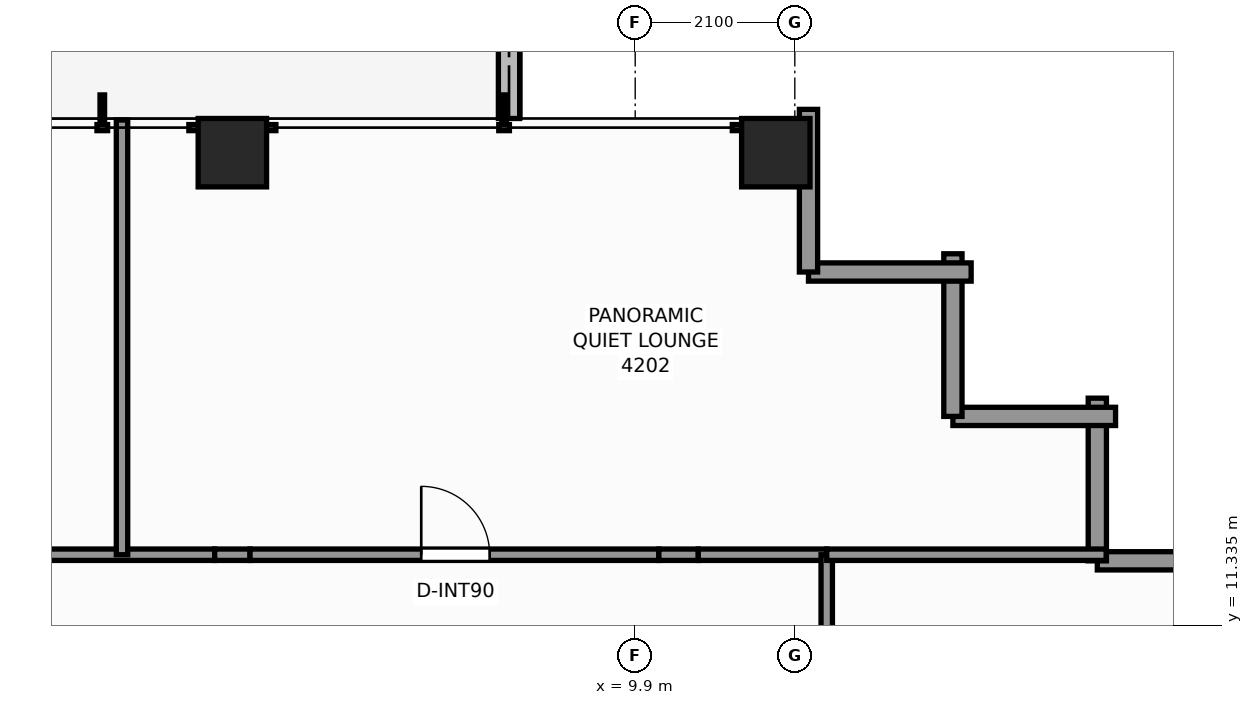
"""IFC4 building model, lengths in metres.
Left out: names, types, materials, properties, quantities, classifications, styles, units other than length and angle.
Written with IfcOpenShell. Run it as: python <this file> out.ifc"""

import sys

from ifc_helpers import new_model, si_unit, direction, frame, frame_2d, origin, origin_2d, place, context, subcontext, project, spatial, rectangle, extrude, element, fill, save


model = new_model("IFC4")
c1 = context("Model", 3, precision=1e-05, world=origin(), true_north=direction((0.0, 1.0)))
c2 = subcontext(c1, "Body", "Model", "MODEL_VIEW")
j1 = project(units=[si_unit("LENGTHUNIT", "METRE"), si_unit("PLANEANGLEUNIT", "RADIAN")], contexts=[c1])
p1 = place(None, origin())
s1 = spatial("IfcSite", under=j1, at=p1, CompositionType="ELEMENT")
p2 = place(p1, origin())
s2 = spatial("IfcBuilding", under=s1, at=p2, CompositionType="ELEMENT")
p3 = place(p2, frame((0.0, 0.0, 144.8)))
s3 = spatial("IfcBuildingStorey", under=s2, at=p3, CompositionType="ELEMENT", Elevation=144.8)
for number, where, z_axis, x_axis in (
    (1, (4.6, 17.55, 0.0), (0.0, 0.0, 1.0), (1.0, 0.0, 0.0)),
    (2, (11.75, 17.55, 0.0), (0.0, 0.0, 1.0), (1.0, 0.0, 0.0)),
):
    element("IfcColumn", number, at=place(p3, frame(where, z_axis=z_axis, x_axis=x_axis)), inside=s3, PredefinedType="COLUMN", context=c2, shape_type="SweptSolid", body=[
        extrude(rectangle(XDim=0.9, YDim=0.9, at=origin_2d()), origin(), (0.0, 0.0, 1.0), 3.3),
    ])
p4 = place(p3, frame((8.24, 18.0, -0.02), z_axis=(0.0, 0.0, 1.0), x_axis=(0.0, 1.0, 0.0)))
e3 = element("IfcWall", 3, at=p4, inside=s3, PredefinedType="PARAPET", context=c2, shape_type="SweptSolid", body=[
    extrude(rectangle(XDim=3.42, YDim=0.28, at=frame_2d((1.71, 0.0))), origin(), (0.0, 0.0, 1.0), 0.42),
])
for number, where, z_axis, x_axis in (
    (4, (15.98, 12.18, 0.0), (0.0, 0.0, 1.0), (1.0, 0.0, 0.0)),
    (5, (15.98, 14.32, 0.0), (0.0, 0.0, 1.0), (0.0, -1.0, 0.0)),
):
    element("IfcWall", number, at=place(p3, frame(where, z_axis=z_axis, x_axis=x_axis)), inside=s3, PredefinedType="STANDARD", context=c2, shape_type="SweptSolid", body=[
        extrude(rectangle(XDim=2.14, YDim=0.24, at=frame_2d((1.07, 0.0))), origin(), (0.0, 0.0, 1.0), 2.329),
    ])
for number, where, z_axis, x_axis in (
    (6, (14.08, 14.08, 0.0), (0.0, 0.0, 1.0), (1.0, 0.0, 0.0)),
    (7, (14.08, 16.22, 0.0), (0.0, 0.0, 1.0), (0.0, -1.0, 0.0)),
):
    element("IfcWall", number, at=place(p3, frame(where, z_axis=z_axis, x_axis=x_axis)), inside=s3, PredefinedType="STANDARD", context=c2, shape_type="SweptSolid", body=[
        extrude(rectangle(XDim=2.14, YDim=0.24, at=frame_2d((1.07, 0.0))), origin(), (0.0, 0.0, 1.0), 2.329),
    ])
for number, where, z_axis, x_axis in (
    (8, (12.18, 15.98, 0.0), (0.0, 0.0, 1.0), (1.0, 0.0, 0.0)),
    (9, (12.18, 18.12, 0.0), (0.0, 0.0, 1.0), (0.0, -1.0, 0.0)),
):
    element("IfcWall", number, at=place(p3, frame(where, z_axis=z_axis, x_axis=x_axis)), inside=s3, PredefinedType="STANDARD", context=c2, shape_type="SweptSolid", body=[
        extrude(rectangle(XDim=2.14, YDim=0.24, at=frame_2d((1.07, 0.0))), origin(), (0.0, 0.0, 1.0), 2.329),
    ])
p5 = place(p3, frame((-4.367, 12.26, 0.0), z_axis=(0.0, 0.0, 1.0), x_axis=(1.0, 0.0, 0.0)))
e10 = element("IfcWall", 10, at=p5, inside=s3, PredefinedType="PARTITIONING", context=c2, shape_type="SweptSolid", body=[
    extrude(rectangle(XDim=8.735, YDim=0.15, at=frame_2d((4.367, 0.0))), origin(), (0.0, 0.0, 1.0), 2.475),
])
p6 = place(p5, frame((1.887, 0.0, 0.0)))
e11 = element("IfcOpeningElement", 11, at=p6, cuts=e10, PredefinedType="OPENING", context=c2, shape_type="SweptSolid", body=[
    extrude(rectangle(XDim=0.9, YDim=2.06, at=frame_2d((0.45, 1.03))), frame((0.0, 0.085, 0.0), z_axis=(0.0, -1.0, 0.0), x_axis=(1.0, 0.0, 0.0)), (0.0, 0.0, 1.0), 0.17),
])
p7 = place(p3, frame((4.367, 12.26, 0.0), z_axis=(0.0, 0.0, 1.0), x_axis=(1.0, 0.0, 0.0)))
e12 = element("IfcWall", 12, at=p7, inside=s3, PredefinedType="PARTITIONING", context=c2, shape_type="SweptSolid", body=[
    extrude(rectangle(XDim=0.465, YDim=0.15, at=frame_2d((0.232, 0.0))), origin(), (0.0, 0.0, 1.0), 2.162),
])
p8 = place(p3, frame((4.833, 12.26, 0.0), z_axis=(0.0, 0.0, 1.0), x_axis=(1.0, 0.0, 0.0)))
e13 = element("IfcWall", 13, at=p8, inside=s3, PredefinedType="PARTITIONING", context=c2, shape_type="SweptSolid", body=[
    extrude(rectangle(XDim=5.379, YDim=0.15, at=frame_2d((2.689, 0.0))), origin(), (0.0, 0.0, 1.0), 2.95),
])
p9 = place(p8, frame((2.252, 0.0, 0.0)))
e14 = element("IfcOpeningElement", 14, at=p9, cuts=e13, PredefinedType="OPENING", context=c2, shape_type="SweptSolid", body=[
    extrude(rectangle(XDim=0.9, YDim=2.06, at=frame_2d((0.45, 1.03))), frame((0.0, 0.085, 0.0), z_axis=(0.0, -1.0, 0.0), x_axis=(1.0, 0.0, 0.0)), (0.0, 0.0, 1.0), 0.17),
])
p10 = place(p3, frame((10.211, 12.26, 0.0), z_axis=(0.0, 0.0, 1.0), x_axis=(1.0, 0.0, 0.0)))
e15 = element("IfcWall", 15, at=p10, inside=s3, PredefinedType="PARTITIONING", context=c2, shape_type="SweptSolid", body=[
    extrude(rectangle(XDim=0.519, YDim=0.15, at=frame_2d((0.259, 0.0))), origin(), (0.0, 0.0, 1.0), 2.162),
])
p11 = place(p3, frame((10.73, 12.26, 0.0), z_axis=(0.0, 0.0, 1.0), x_axis=(1.0, 0.0, 0.0)))
e16 = element("IfcWall", 16, at=p11, inside=s3, PredefinedType="PARTITIONING", context=c2, shape_type="SweptSolid", body=[
    extrude(rectangle(XDim=1.69, YDim=0.15, at=frame_2d((0.845, 0.0))), origin(), (0.0, 0.0, 1.0), 2.95),
])
p12 = place(p3, frame((12.42, 10.769, 0.0), z_axis=(0.0, 0.0, 1.0), x_axis=(0.0, 1.0, 0.0)))
e17 = element("IfcWall", 17, at=p12, inside=s3, PredefinedType="PARTITIONING", context=c2, shape_type="SweptSolid", body=[
    extrude(rectangle(XDim=1.491, YDim=0.15, at=frame_2d((0.746, 0.0))), origin(), (0.0, 0.0, 1.0), 2.95),
])
p13 = place(p3, frame((12.42, 12.26, 0.0), z_axis=(0.0, 0.0, 1.0), x_axis=(1.0, 0.0, 0.0)))
e18 = element("IfcWall", 18, at=p13, inside=s3, PredefinedType="PARTITIONING", context=c2, shape_type="SweptSolid", body=[
    extrude(rectangle(XDim=3.676, YDim=0.15, at=frame_2d((1.838, 0.0))), origin(), (0.0, 0.0, 1.0), 2.95),
])
p14 = place(p3, frame((3.148, 12.26, 0.0), z_axis=(0.0, 0.0, 1.0), x_axis=(0.0, 1.0, 0.0)))
e19 = element("IfcWall", 19, at=p14, inside=s3, PredefinedType="PARTITIONING", context=c2, shape_type="SweptSolid", body=[
    extrude(rectangle(XDim=5.72, YDim=0.15, at=frame_2d((2.86, 0.0))), origin(), (0.0, 0.0, 1.0), 2.319),
])
p15 = place(p9, origin())
e20 = element("IfcDoor", 20, at=p15, inside=s3, OperationType="SINGLE_SWING_LEFT", PredefinedType="DOOR", context=c2, shape_type="SweptSolid", body=[
    extrude(rectangle(XDim=0.9, YDim=2.06, at=frame_2d((0.45, 1.03))), frame((0.0, 0.025, 0.0), z_axis=(0.0, -1.0, 0.0), x_axis=(1.0, 0.0, 0.0)), (0.0, 0.0, 1.0), 0.05),
])
fill(e14, e20)
save(model, sys.argv[1])
